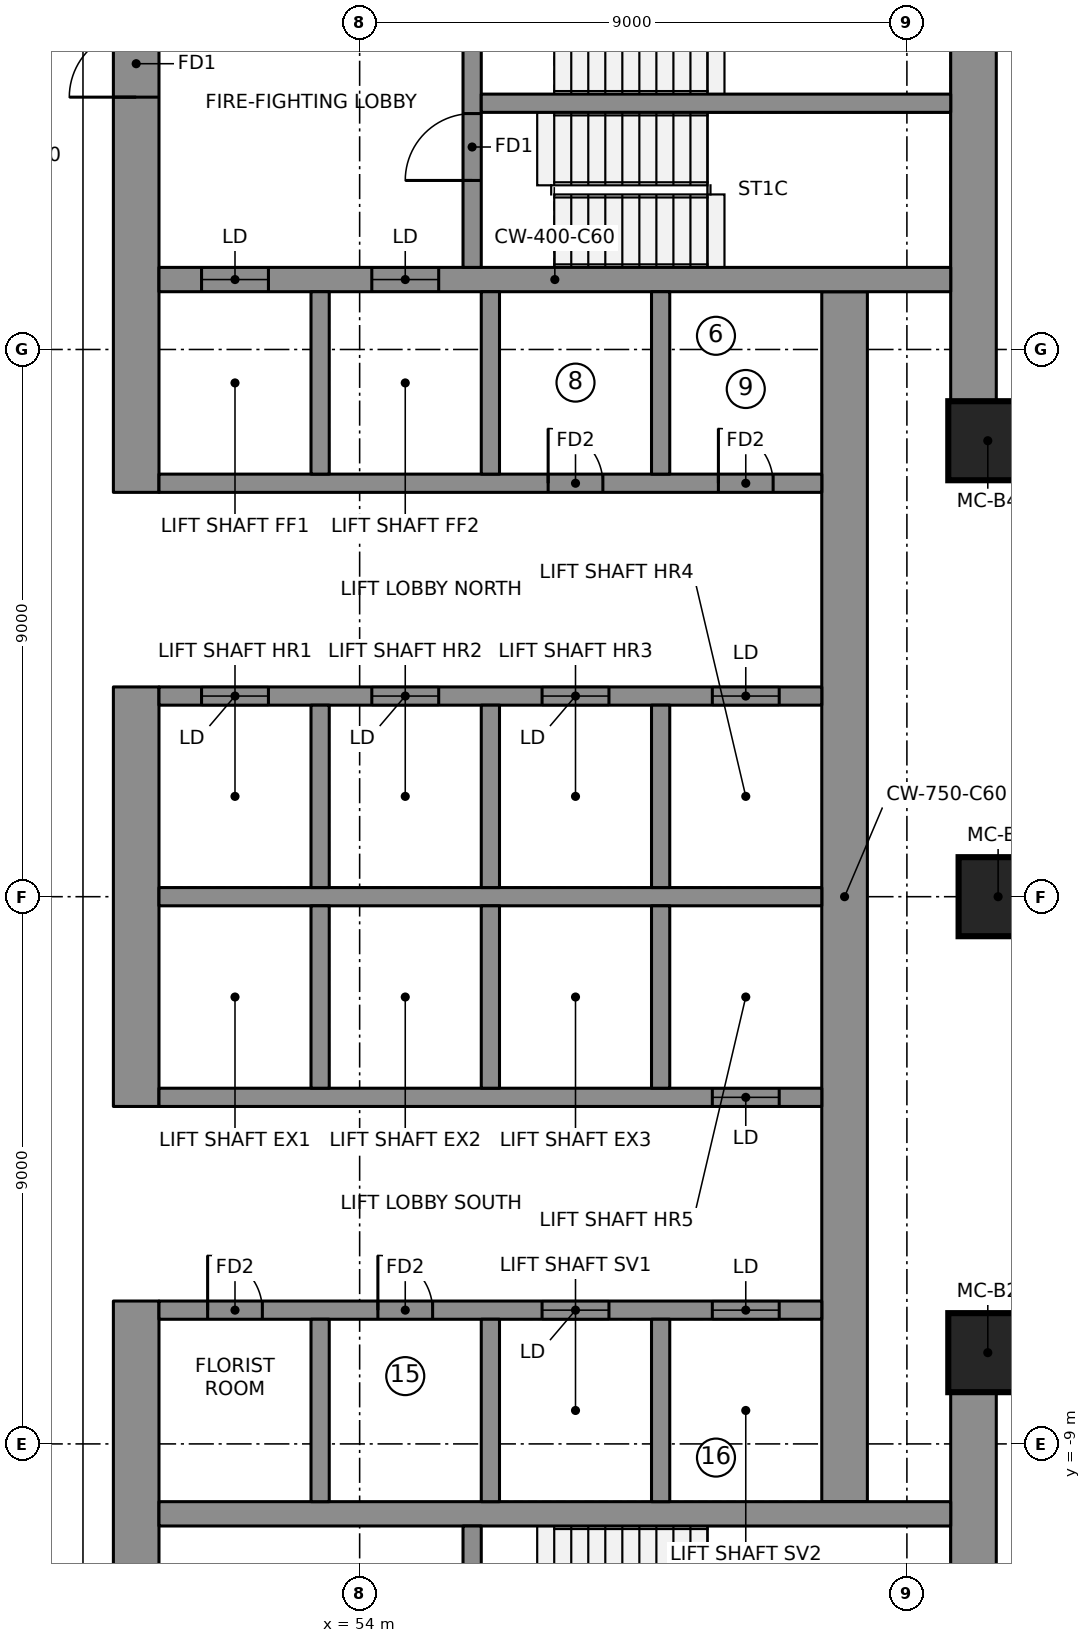
"""IFC4 building model, lengths in metres.
Left out: names, types, materials, properties, quantities, classifications, styles, units other than length and angle.
Written with IfcOpenShell. Run it as: python <this file> out.ifc"""

import sys

from ifc_helpers import new_model, si_unit, direction, frame, frame_2d, origin, origin_2d, place, context, subcontext, project, spatial, rectangle, extrude, element, fill, save


model = new_model("IFC4")
c1 = context("Model", 3, precision=1e-05, world=origin(), true_north=direction((0.0, 1.0)))
c2 = subcontext(c1, "Body", "Model", "MODEL_VIEW")
j1 = project(units=[si_unit("LENGTHUNIT", "METRE"), si_unit("PLANEANGLEUNIT", "RADIAN")], contexts=[c1])
p1 = place(None, origin())
s1 = spatial("IfcSite", under=j1, at=p1, CompositionType="ELEMENT")
p2 = place(p1, origin())
s2 = spatial("IfcBuilding", under=s1, at=p2, CompositionType="ELEMENT")
p3 = place(p2, frame((0.0, 0.0, 182.6)))
s3 = spatial("IfcBuildingStorey", under=s2, at=p3, CompositionType="ELEMENT", Elevation=182.6)
p4 = place(p3, frame((50.325, 6.65, 0.0), z_axis=(0.0, 0.0, 1.0), x_axis=(0.0, 1.0, 0.0)))
e1 = element("IfcWall", 1, at=p4, inside=s3, PredefinedType="SHEAR", context=c2, shape_type="SweptSolid", body=[
    extrude(rectangle(XDim=9.85, YDim=0.75, at=frame_2d((4.925, 0.0))), origin(), (0.0, 0.0, 1.0), 3.55),
])
p5 = place(p4, frame((6.5, 0.0, 0.0)))
e2 = element("IfcOpeningElement", 2, at=p5, cuts=e1, PredefinedType="OPENING", context=c2, shape_type="SweptSolid", body=[
    extrude(rectangle(XDim=1.1, YDim=2.1, at=frame_2d((0.55, 1.05))), frame((0.0, 0.385, 0.0), z_axis=(0.0, -1.0, 0.0), x_axis=(1.0, 0.0, 0.0)), (0.0, 0.0, 1.0), 0.77),
])
p6 = place(p3, frame((50.325, -3.45, 0.0), z_axis=(0.0, 0.0, 1.0), x_axis=(0.0, 1.0, 0.0)))
e3 = element("IfcWall", 3, at=p6, inside=s3, PredefinedType="SHEAR", context=c2, shape_type="SweptSolid", body=[
    extrude(rectangle(XDim=6.9, YDim=0.75, at=frame_2d((3.45, 0.0))), origin(), (0.0, 0.0, 1.0), 3.55),
])
p7 = place(p3, frame((50.325, -16.5, 0.0), z_axis=(0.0, 0.0, 1.0), x_axis=(0.0, 1.0, 0.0)))
e4 = element("IfcWall", 4, at=p7, inside=s3, PredefinedType="SHEAR", context=c2, shape_type="SweptSolid", body=[
    extrude(rectangle(XDim=9.85, YDim=0.75, at=frame_2d((4.925, 0.0))), origin(), (0.0, 0.0, 1.0), 3.55),
])
p8 = place(p7, frame((2.25, 0.0, 0.0)))
e5 = element("IfcOpeningElement", 5, at=p8, cuts=e4, PredefinedType="OPENING", context=c2, shape_type="SweptSolid", body=[
    extrude(rectangle(XDim=1.1, YDim=2.1, at=frame_2d((0.55, 1.05))), frame((0.0, 0.385, 0.0), z_axis=(0.0, -1.0, 0.0), x_axis=(1.0, 0.0, 0.0)), (0.0, 0.0, 1.0), 0.77),
])
for number, where, z_axis, x_axis in (
    (6, (64.095, 8.099, 0.0), (0.0, 0.0, 1.0), (0.0, 1.0, 0.0)),
    (7, (64.095, -15.75, 0.0), (0.0, 0.0, 1.0), (0.0, 1.0, 0.0)),
):
    element("IfcWall", number, at=place(p3, frame(where, z_axis=z_axis, x_axis=x_axis)), inside=s3, PredefinedType="SHEAR", context=c2, shape_type="SweptSolid", body=[
        extrude(rectangle(XDim=7.651, YDim=0.75, at=frame_2d((3.825, 0.0))), origin(), (0.0, 0.0, 1.0), 3.55),
    ])
p9 = place(p3, frame((61.975, -9.95, 0.0), z_axis=(0.0, 0.0, 1.0), x_axis=(0.0, 1.0, 0.0)))
e8 = element("IfcWall", 8, at=p9, inside=s3, PredefinedType="SHEAR", context=c2, shape_type="SweptSolid", body=[
    extrude(rectangle(XDim=19.9, YDim=0.75, at=frame_2d((9.95, 0.0))), origin(), (0.0, 0.0, 1.0), 3.55),
])
p10 = place(p3, frame((50.7, 10.15, 0.0), z_axis=(0.0, 0.0, 1.0), x_axis=(1.0, 0.0, 0.0)))
e9 = element("IfcWall", 9, at=p10, inside=s3, PredefinedType="SHEAR", context=c2, shape_type="SweptSolid", body=[
    extrude(rectangle(XDim=13.02, YDim=0.4, at=frame_2d((6.51, 0.0))), origin(), (0.0, 0.0, 1.0), 3.55),
])
p11 = place(p10, frame((0.7, 0.0, 0.0)))
e10 = element("IfcOpeningElement", 10, at=p11, cuts=e9, PredefinedType="OPENING", context=c2, shape_type="SweptSolid", body=[
    extrude(rectangle(XDim=1.1, YDim=2.1, at=frame_2d((0.55, 1.05))), frame((0.0, 0.21, 0.0), z_axis=(0.0, -1.0, 0.0), x_axis=(1.0, 0.0, 0.0)), (0.0, 0.0, 1.0), 0.42),
])
p12 = place(p10, frame((3.5, 0.0, 0.0)))
e11 = element("IfcOpeningElement", 11, at=p12, cuts=e9, PredefinedType="OPENING", context=c2, shape_type="SweptSolid", body=[
    extrude(rectangle(XDim=1.1, YDim=2.1, at=frame_2d((0.55, 1.05))), frame((0.0, 0.21, 0.0), z_axis=(0.0, -1.0, 0.0), x_axis=(1.0, 0.0, 0.0)), (0.0, 0.0, 1.0), 0.42),
])
p13 = place(p3, frame((50.7, -10.15, 0.0), z_axis=(0.0, 0.0, 1.0), x_axis=(1.0, 0.0, 0.0)))
e12 = element("IfcWall", 12, at=p13, inside=s3, PredefinedType="SHEAR", context=c2, shape_type="SweptSolid", body=[
    extrude(rectangle(XDim=13.02, YDim=0.4, at=frame_2d((6.51, 0.0))), origin(), (0.0, 0.0, 1.0), 3.55),
])
p14 = place(p3, frame((50.7, 0.0, 0.0), z_axis=(0.0, 0.0, 1.0), x_axis=(1.0, 0.0, 0.0)))
e13 = element("IfcWall", 13, at=p14, inside=s3, PredefinedType="SHEAR", context=c2, shape_type="SweptSolid", body=[
    extrude(rectangle(XDim=10.9, YDim=0.3, at=frame_2d((5.45, 0.0))), origin(), (0.0, 0.0, 1.0), 3.55),
])
p15 = place(p3, frame((50.7, 3.3, 0.0), z_axis=(0.0, 0.0, 1.0), x_axis=(1.0, 0.0, 0.0)))
e14 = element("IfcWall", 14, at=p15, inside=s3, PredefinedType="SHEAR", context=c2, shape_type="SweptSolid", body=[
    extrude(rectangle(XDim=10.9, YDim=0.3, at=frame_2d((5.45, 0.0))), origin(), (0.0, 0.0, 1.0), 3.55),
])
p16 = place(p15, frame((0.7, 0.0, 0.0)))
e15 = element("IfcOpeningElement", 15, at=p16, cuts=e14, PredefinedType="OPENING", context=c2, shape_type="SweptSolid", body=[
    extrude(rectangle(XDim=1.1, YDim=2.1, at=frame_2d((0.55, 1.05))), frame((0.0, 0.16, 0.0), z_axis=(0.0, -1.0, 0.0), x_axis=(1.0, 0.0, 0.0)), (0.0, 0.0, 1.0), 0.32),
])
p17 = place(p15, frame((3.5, 0.0, 0.0)))
e16 = element("IfcOpeningElement", 16, at=p17, cuts=e14, PredefinedType="OPENING", context=c2, shape_type="SweptSolid", body=[
    extrude(rectangle(XDim=1.1, YDim=2.1, at=frame_2d((0.55, 1.05))), frame((0.0, 0.16, 0.0), z_axis=(0.0, -1.0, 0.0), x_axis=(1.0, 0.0, 0.0)), (0.0, 0.0, 1.0), 0.32),
])
p18 = place(p15, frame((6.3, 0.0, 0.0)))
e17 = element("IfcOpeningElement", 17, at=p18, cuts=e14, PredefinedType="OPENING", context=c2, shape_type="SweptSolid", body=[
    extrude(rectangle(XDim=1.1, YDim=2.1, at=frame_2d((0.55, 1.05))), frame((0.0, 0.16, 0.0), z_axis=(0.0, -1.0, 0.0), x_axis=(1.0, 0.0, 0.0)), (0.0, 0.0, 1.0), 0.32),
])
p19 = place(p15, frame((9.1, 0.0, 0.0)))
e18 = element("IfcOpeningElement", 18, at=p19, cuts=e14, PredefinedType="OPENING", context=c2, shape_type="SweptSolid", body=[
    extrude(rectangle(XDim=1.1, YDim=2.1, at=frame_2d((0.55, 1.05))), frame((0.0, 0.16, 0.0), z_axis=(0.0, -1.0, 0.0), x_axis=(1.0, 0.0, 0.0)), (0.0, 0.0, 1.0), 0.32),
])
p20 = place(p3, frame((50.7, 6.8, 0.0), z_axis=(0.0, 0.0, 1.0), x_axis=(1.0, 0.0, 0.0)))
e19 = element("IfcWall", 19, at=p20, inside=s3, PredefinedType="SHEAR", context=c2, shape_type="SweptSolid", body=[
    extrude(rectangle(XDim=10.9, YDim=0.3, at=frame_2d((5.45, 0.0))), origin(), (0.0, 0.0, 1.0), 3.55),
])
p21 = place(p20, frame((6.4, 0.0, 0.0)))
e20 = element("IfcOpeningElement", 20, at=p21, cuts=e19, PredefinedType="OPENING", context=c2, shape_type="SweptSolid", body=[
    extrude(rectangle(XDim=0.9, YDim=2.1, at=frame_2d((0.45, 1.05))), frame((0.0, 0.16, 0.0), z_axis=(0.0, -1.0, 0.0), x_axis=(1.0, 0.0, 0.0)), (0.0, 0.0, 1.0), 0.32),
])
p22 = place(p20, frame((9.2, 0.0, 0.0)))
e21 = element("IfcOpeningElement", 21, at=p22, cuts=e19, PredefinedType="OPENING", context=c2, shape_type="SweptSolid", body=[
    extrude(rectangle(XDim=0.9, YDim=2.1, at=frame_2d((0.45, 1.05))), frame((0.0, 0.16, 0.0), z_axis=(0.0, -1.0, 0.0), x_axis=(1.0, 0.0, 0.0)), (0.0, 0.0, 1.0), 0.32),
])
for number, where, z_axis, x_axis in (
    (22, (53.35, 0.15, 0.0), (0.0, 0.0, 1.0), (0.0, 1.0, 0.0)),
    (23, (53.35, 6.95, 0.0), (0.0, 0.0, 1.0), (0.0, 1.0, 0.0)),
    (24, (56.15, 0.15, 0.0), (0.0, 0.0, 1.0), (0.0, 1.0, 0.0)),
    (25, (56.15, 6.95, 0.0), (0.0, 0.0, 1.0), (0.0, 1.0, 0.0)),
    (26, (58.95, 0.15, 0.0), (0.0, 0.0, 1.0), (0.0, 1.0, 0.0)),
    (27, (58.95, 6.95, 0.0), (0.0, 0.0, 1.0), (0.0, 1.0, 0.0)),
):
    element("IfcWall", number, at=place(p3, frame(where, z_axis=z_axis, x_axis=x_axis)), inside=s3, PredefinedType="SHEAR", context=c2, shape_type="SweptSolid", body=[
        extrude(rectangle(XDim=3.0, YDim=0.3, at=frame_2d((1.5, 0.0))), origin(), (0.0, 0.0, 1.0), 3.55),
    ])
p23 = place(p3, frame((50.7, -3.3, 0.0), z_axis=(0.0, 0.0, 1.0), x_axis=(1.0, 0.0, 0.0)))
e28 = element("IfcWall", 28, at=p23, inside=s3, PredefinedType="SHEAR", context=c2, shape_type="SweptSolid", body=[
    extrude(rectangle(XDim=10.9, YDim=0.3, at=frame_2d((5.45, 0.0))), origin(), (0.0, 0.0, 1.0), 3.55),
])
p24 = place(p23, frame((9.1, 0.0, 0.0)))
e29 = element("IfcOpeningElement", 29, at=p24, cuts=e28, PredefinedType="OPENING", context=c2, shape_type="SweptSolid", body=[
    extrude(rectangle(XDim=1.1, YDim=2.1, at=frame_2d((0.55, 1.05))), frame((0.0, 0.16, 0.0), z_axis=(0.0, -1.0, 0.0), x_axis=(1.0, 0.0, 0.0)), (0.0, 0.0, 1.0), 0.32),
])
p25 = place(p3, frame((50.7, -6.8, 0.0), z_axis=(0.0, 0.0, 1.0), x_axis=(1.0, 0.0, 0.0)))
e30 = element("IfcWall", 30, at=p25, inside=s3, PredefinedType="SHEAR", context=c2, shape_type="SweptSolid", body=[
    extrude(rectangle(XDim=10.9, YDim=0.3, at=frame_2d((5.45, 0.0))), origin(), (0.0, 0.0, 1.0), 3.55),
])
p26 = place(p25, frame((6.3, 0.0, 0.0)))
e31 = element("IfcOpeningElement", 31, at=p26, cuts=e30, PredefinedType="OPENING", context=c2, shape_type="SweptSolid", body=[
    extrude(rectangle(XDim=1.1, YDim=2.1, at=frame_2d((0.55, 1.05))), frame((0.0, 0.16, 0.0), z_axis=(0.0, -1.0, 0.0), x_axis=(1.0, 0.0, 0.0)), (0.0, 0.0, 1.0), 0.32),
])
p27 = place(p25, frame((9.1, 0.0, 0.0)))
e32 = element("IfcOpeningElement", 32, at=p27, cuts=e30, PredefinedType="OPENING", context=c2, shape_type="SweptSolid", body=[
    extrude(rectangle(XDim=1.1, YDim=2.1, at=frame_2d((0.55, 1.05))), frame((0.0, 0.16, 0.0), z_axis=(0.0, -1.0, 0.0), x_axis=(1.0, 0.0, 0.0)), (0.0, 0.0, 1.0), 0.32),
])
p28 = place(p25, frame((0.8, 0.0, 0.0)))
e33 = element("IfcOpeningElement", 33, at=p28, cuts=e30, PredefinedType="OPENING", context=c2, shape_type="SweptSolid", body=[
    extrude(rectangle(XDim=0.9, YDim=2.1, at=frame_2d((0.45, 1.05))), frame((0.0, 0.16, 0.0), z_axis=(0.0, -1.0, 0.0), x_axis=(1.0, 0.0, 0.0)), (0.0, 0.0, 1.0), 0.32),
])
p29 = place(p25, frame((3.6, 0.0, 0.0)))
e34 = element("IfcOpeningElement", 34, at=p29, cuts=e30, PredefinedType="OPENING", context=c2, shape_type="SweptSolid", body=[
    extrude(rectangle(XDim=0.9, YDim=2.1, at=frame_2d((0.45, 1.05))), frame((0.0, 0.16, 0.0), z_axis=(0.0, -1.0, 0.0), x_axis=(1.0, 0.0, 0.0)), (0.0, 0.0, 1.0), 0.32),
])
for number, where, z_axis, x_axis in (
    (35, (53.35, -3.15, 0.0), (0.0, 0.0, 1.0), (0.0, 1.0, 0.0)),
    (36, (53.35, -9.95, 0.0), (0.0, 0.0, 1.0), (0.0, 1.0, 0.0)),
    (37, (56.15, -3.15, 0.0), (0.0, 0.0, 1.0), (0.0, 1.0, 0.0)),
    (38, (56.15, -9.95, 0.0), (0.0, 0.0, 1.0), (0.0, 1.0, 0.0)),
    (39, (58.95, -3.15, 0.0), (0.0, 0.0, 1.0), (0.0, 1.0, 0.0)),
    (40, (58.95, -9.95, 0.0), (0.0, 0.0, 1.0), (0.0, 1.0, 0.0)),
):
    element("IfcWall", number, at=place(p3, frame(where, z_axis=z_axis, x_axis=x_axis)), inside=s3, PredefinedType="SHEAR", context=c2, shape_type="SweptSolid", body=[
        extrude(rectangle(XDim=3.0, YDim=0.3, at=frame_2d((1.5, 0.0))), origin(), (0.0, 0.0, 1.0), 3.55),
    ])
p30 = place(p3, frame((55.85, 10.35, 0.0), z_axis=(0.0, 0.0, 1.0), x_axis=(0.0, 1.0, 0.0)))
e41 = element("IfcWall", 41, at=p30, inside=s3, PredefinedType="SHEAR", context=c2, shape_type="SweptSolid", body=[
    extrude(rectangle(XDim=5.4, YDim=0.3, at=frame_2d((2.7, 0.0))), origin(), (0.0, 0.0, 1.0), 3.55),
])
p31 = place(p30, frame((1.43, 0.0, 0.0)))
e42 = element("IfcOpeningElement", 42, at=p31, cuts=e41, PredefinedType="OPENING", context=c2, shape_type="SweptSolid", body=[
    extrude(rectangle(XDim=1.1, YDim=2.1, at=frame_2d((0.55, 1.05))), frame((0.0, 0.16, 0.0), z_axis=(0.0, -1.0, 0.0), x_axis=(1.0, 0.0, 0.0)), (0.0, 0.0, 1.0), 0.32),
])
p32 = place(p30, frame((3.6, 0.0, 0.0)))
e43 = element("IfcOpeningElement", 43, at=p32, cuts=e41, PredefinedType="OPENING", context=c2, shape_type="SweptSolid", body=[
    extrude(rectangle(XDim=1.1, YDim=2.1, at=frame_2d((0.55, 1.05))), frame((0.0, 0.16, 0.0), z_axis=(0.0, -1.0, 0.0), x_axis=(1.0, 0.0, 0.0)), (0.0, 0.0, 1.0), 0.32),
])
p33 = place(p3, frame((55.85, -15.75, 0.0), z_axis=(0.0, 0.0, 1.0), x_axis=(0.0, 1.0, 0.0)))
e44 = element("IfcWall", 44, at=p33, inside=s3, PredefinedType="SHEAR", context=c2, shape_type="SweptSolid", body=[
    extrude(rectangle(XDim=5.4, YDim=0.3, at=frame_2d((2.7, 0.0))), origin(), (0.0, 0.0, 1.0), 3.55),
])
p34 = place(p33, frame((3.6, 0.0, 0.0)))
e45 = element("IfcOpeningElement", 45, at=p34, cuts=e44, PredefinedType="OPENING", context=c2, shape_type="SweptSolid", body=[
    extrude(rectangle(XDim=1.1, YDim=2.1, at=frame_2d((0.55, 1.05))), frame((0.0, 0.16, 0.0), z_axis=(0.0, -1.0, 0.0), x_axis=(1.0, 0.0, 0.0)), (0.0, 0.0, 1.0), 0.32),
])
p35 = place(p33, frame((0.8, 0.0, 0.0)))
e46 = element("IfcOpeningElement", 46, at=p35, cuts=e44, PredefinedType="OPENING", context=c2, shape_type="SweptSolid", body=[
    extrude(rectangle(XDim=0.9, YDim=2.1, at=frame_2d((0.45, 1.05))), frame((0.0, 0.16, 0.0), z_axis=(0.0, -1.0, 0.0), x_axis=(1.0, 0.0, 0.0)), (0.0, 0.0, 1.0), 0.32),
])
p36 = place(p3, frame((56.0, 13.05, 0.0), z_axis=(0.0, 0.0, 1.0), x_axis=(1.0, 0.0, 0.0)))
e47 = element("IfcWall", 47, at=p36, inside=s3, PredefinedType="SHEAR", context=c2, shape_type="SweptSolid", body=[
    extrude(rectangle(XDim=7.72, YDim=0.3, at=frame_2d((3.86, 0.0))), origin(), (0.0, 0.0, 1.0), 3.55),
])
for number, where, z_axis, x_axis in (
    (48, (64.33, -7.499, 0.0), (0.0, 0.0, 1.0), (1.0, 0.0, 0.0)),
    (49, (64.5, 0.0, 0.0), (0.0, 0.0, 1.0), (1.0, 0.0, 0.0)),
    (50, (64.33, 7.499, 0.0), (0.0, 0.0, 1.0), (1.0, 0.0, 0.0)),
):
    element("IfcColumn", number, at=place(p3, frame(where, z_axis=z_axis, x_axis=x_axis)), inside=s3, PredefinedType="COLUMN", context=c2, shape_type="SweptSolid", body=[
        extrude(rectangle(XDim=1.3, YDim=1.3, at=origin_2d()), origin(), (0.0, 0.0, 1.0), 3.55),
    ])
p37 = place(p11, origin())
e51 = element("IfcDoor", 51, at=p37, inside=s3, OperationType="DOUBLE_DOOR_SLIDING", PredefinedType="DOOR", context=c2, shape_type="SweptSolid", body=[
    extrude(rectangle(XDim=1.1, YDim=2.1, at=frame_2d((0.55, 1.05))), frame((0.0, 0.025, 0.0), z_axis=(0.0, -1.0, 0.0), x_axis=(1.0, 0.0, 0.0)), (0.0, 0.0, 1.0), 0.05),
])
fill(e10, e51)
p38 = place(p12, origin())
e52 = element("IfcDoor", 52, at=p38, inside=s3, OperationType="DOUBLE_DOOR_SLIDING", PredefinedType="DOOR", context=c2, shape_type="SweptSolid", body=[
    extrude(rectangle(XDim=1.1, YDim=2.1, at=frame_2d((0.55, 1.05))), frame((0.0, 0.025, 0.0), z_axis=(0.0, -1.0, 0.0), x_axis=(1.0, 0.0, 0.0)), (0.0, 0.0, 1.0), 0.05),
])
fill(e11, e52)
p39 = place(p16, origin())
e53 = element("IfcDoor", 53, at=p39, inside=s3, OperationType="DOUBLE_DOOR_SLIDING", PredefinedType="DOOR", context=c2, shape_type="SweptSolid", body=[
    extrude(rectangle(XDim=1.1, YDim=2.1, at=frame_2d((0.55, 1.05))), frame((0.0, 0.025, 0.0), z_axis=(0.0, -1.0, 0.0), x_axis=(1.0, 0.0, 0.0)), (0.0, 0.0, 1.0), 0.05),
])
fill(e15, e53)
p40 = place(p17, origin())
e54 = element("IfcDoor", 54, at=p40, inside=s3, OperationType="DOUBLE_DOOR_SLIDING", PredefinedType="DOOR", context=c2, shape_type="SweptSolid", body=[
    extrude(rectangle(XDim=1.1, YDim=2.1, at=frame_2d((0.55, 1.05))), frame((0.0, 0.025, 0.0), z_axis=(0.0, -1.0, 0.0), x_axis=(1.0, 0.0, 0.0)), (0.0, 0.0, 1.0), 0.05),
])
fill(e16, e54)
p41 = place(p18, origin())
e55 = element("IfcDoor", 55, at=p41, inside=s3, OperationType="DOUBLE_DOOR_SLIDING", PredefinedType="DOOR", context=c2, shape_type="SweptSolid", body=[
    extrude(rectangle(XDim=1.1, YDim=2.1, at=frame_2d((0.55, 1.05))), frame((0.0, 0.025, 0.0), z_axis=(0.0, -1.0, 0.0), x_axis=(1.0, 0.0, 0.0)), (0.0, 0.0, 1.0), 0.05),
])
fill(e17, e55)
p42 = place(p19, origin())
e56 = element("IfcDoor", 56, at=p42, inside=s3, OperationType="DOUBLE_DOOR_SLIDING", PredefinedType="DOOR", context=c2, shape_type="SweptSolid", body=[
    extrude(rectangle(XDim=1.1, YDim=2.1, at=frame_2d((0.55, 1.05))), frame((0.0, 0.025, 0.0), z_axis=(0.0, -1.0, 0.0), x_axis=(1.0, 0.0, 0.0)), (0.0, 0.0, 1.0), 0.05),
])
fill(e18, e56)
p43 = place(p24, origin())
e57 = element("IfcDoor", 57, at=p43, inside=s3, OperationType="DOUBLE_DOOR_SLIDING", PredefinedType="DOOR", context=c2, shape_type="SweptSolid", body=[
    extrude(rectangle(XDim=1.1, YDim=2.1, at=frame_2d((0.55, 1.05))), frame((0.0, 0.025, 0.0), z_axis=(0.0, -1.0, 0.0), x_axis=(1.0, 0.0, 0.0)), (0.0, 0.0, 1.0), 0.05),
])
fill(e29, e57)
p44 = place(p26, origin())
e58 = element("IfcDoor", 58, at=p44, inside=s3, OperationType="DOUBLE_DOOR_SLIDING", PredefinedType="DOOR", context=c2, shape_type="SweptSolid", body=[
    extrude(rectangle(XDim=1.1, YDim=2.1, at=frame_2d((0.55, 1.05))), frame((0.0, 0.025, 0.0), z_axis=(0.0, -1.0, 0.0), x_axis=(1.0, 0.0, 0.0)), (0.0, 0.0, 1.0), 0.05),
])
fill(e31, e58)
p45 = place(p27, origin())
e59 = element("IfcDoor", 59, at=p45, inside=s3, OperationType="DOUBLE_DOOR_SLIDING", PredefinedType="DOOR", context=c2, shape_type="SweptSolid", body=[
    extrude(rectangle(XDim=1.1, YDim=2.1, at=frame_2d((0.55, 1.05))), frame((0.0, 0.025, 0.0), z_axis=(0.0, -1.0, 0.0), x_axis=(1.0, 0.0, 0.0)), (0.0, 0.0, 1.0), 0.05),
])
fill(e32, e59)
p46 = place(p31, origin())
e60 = element("IfcDoor", 60, at=p46, inside=s3, OperationType="SINGLE_SWING_RIGHT", PredefinedType="DOOR", context=c2, shape_type="SweptSolid", body=[
    extrude(rectangle(XDim=1.1, YDim=2.1, at=frame_2d((0.55, 1.05))), frame((0.0, 0.025, 0.0), z_axis=(0.0, -1.0, 0.0), x_axis=(1.0, 0.0, 0.0)), (0.0, 0.0, 1.0), 0.05),
])
fill(e42, e60)
p47 = place(p5, origin())
e61 = element("IfcDoor", 61, at=p47, inside=s3, OperationType="SINGLE_SWING_RIGHT", PredefinedType="DOOR", context=c2, shape_type="SweptSolid", body=[
    extrude(rectangle(XDim=1.1, YDim=2.1, at=frame_2d((0.55, 1.05))), frame((0.0, 0.025, 0.0), z_axis=(0.0, -1.0, 0.0), x_axis=(1.0, 0.0, 0.0)), (0.0, 0.0, 1.0), 0.05),
])
fill(e2, e61)
p48 = place(p21, origin())
e62 = element("IfcDoor", 62, at=p48, inside=s3, OperationType="SINGLE_SWING_LEFT", PredefinedType="DOOR", context=c2, shape_type="SweptSolid", body=[
    extrude(rectangle(XDim=0.9, YDim=2.1, at=frame_2d((0.45, 1.05))), frame((0.0, 0.025, 0.0), z_axis=(0.0, -1.0, 0.0), x_axis=(1.0, 0.0, 0.0)), (0.0, 0.0, 1.0), 0.05),
])
fill(e20, e62)
p49 = place(p22, origin())
e63 = element("IfcDoor", 63, at=p49, inside=s3, OperationType="SINGLE_SWING_LEFT", PredefinedType="DOOR", context=c2, shape_type="SweptSolid", body=[
    extrude(rectangle(XDim=0.9, YDim=2.1, at=frame_2d((0.45, 1.05))), frame((0.0, 0.025, 0.0), z_axis=(0.0, -1.0, 0.0), x_axis=(1.0, 0.0, 0.0)), (0.0, 0.0, 1.0), 0.05),
])
fill(e21, e63)
p50 = place(p28, origin())
e64 = element("IfcDoor", 64, at=p50, inside=s3, OperationType="SINGLE_SWING_LEFT", PredefinedType="DOOR", context=c2, shape_type="SweptSolid", body=[
    extrude(rectangle(XDim=0.9, YDim=2.1, at=frame_2d((0.45, 1.05))), frame((0.0, 0.025, 0.0), z_axis=(0.0, -1.0, 0.0), x_axis=(1.0, 0.0, 0.0)), (0.0, 0.0, 1.0), 0.05),
])
fill(e33, e64)
p51 = place(p29, origin())
e65 = element("IfcDoor", 65, at=p51, inside=s3, OperationType="SINGLE_SWING_LEFT", PredefinedType="DOOR", context=c2, shape_type="SweptSolid", body=[
    extrude(rectangle(XDim=0.9, YDim=2.1, at=frame_2d((0.45, 1.05))), frame((0.0, 0.025, 0.0), z_axis=(0.0, -1.0, 0.0), x_axis=(1.0, 0.0, 0.0)), (0.0, 0.0, 1.0), 0.05),
])
fill(e34, e65)
save(model, sys.argv[1])
